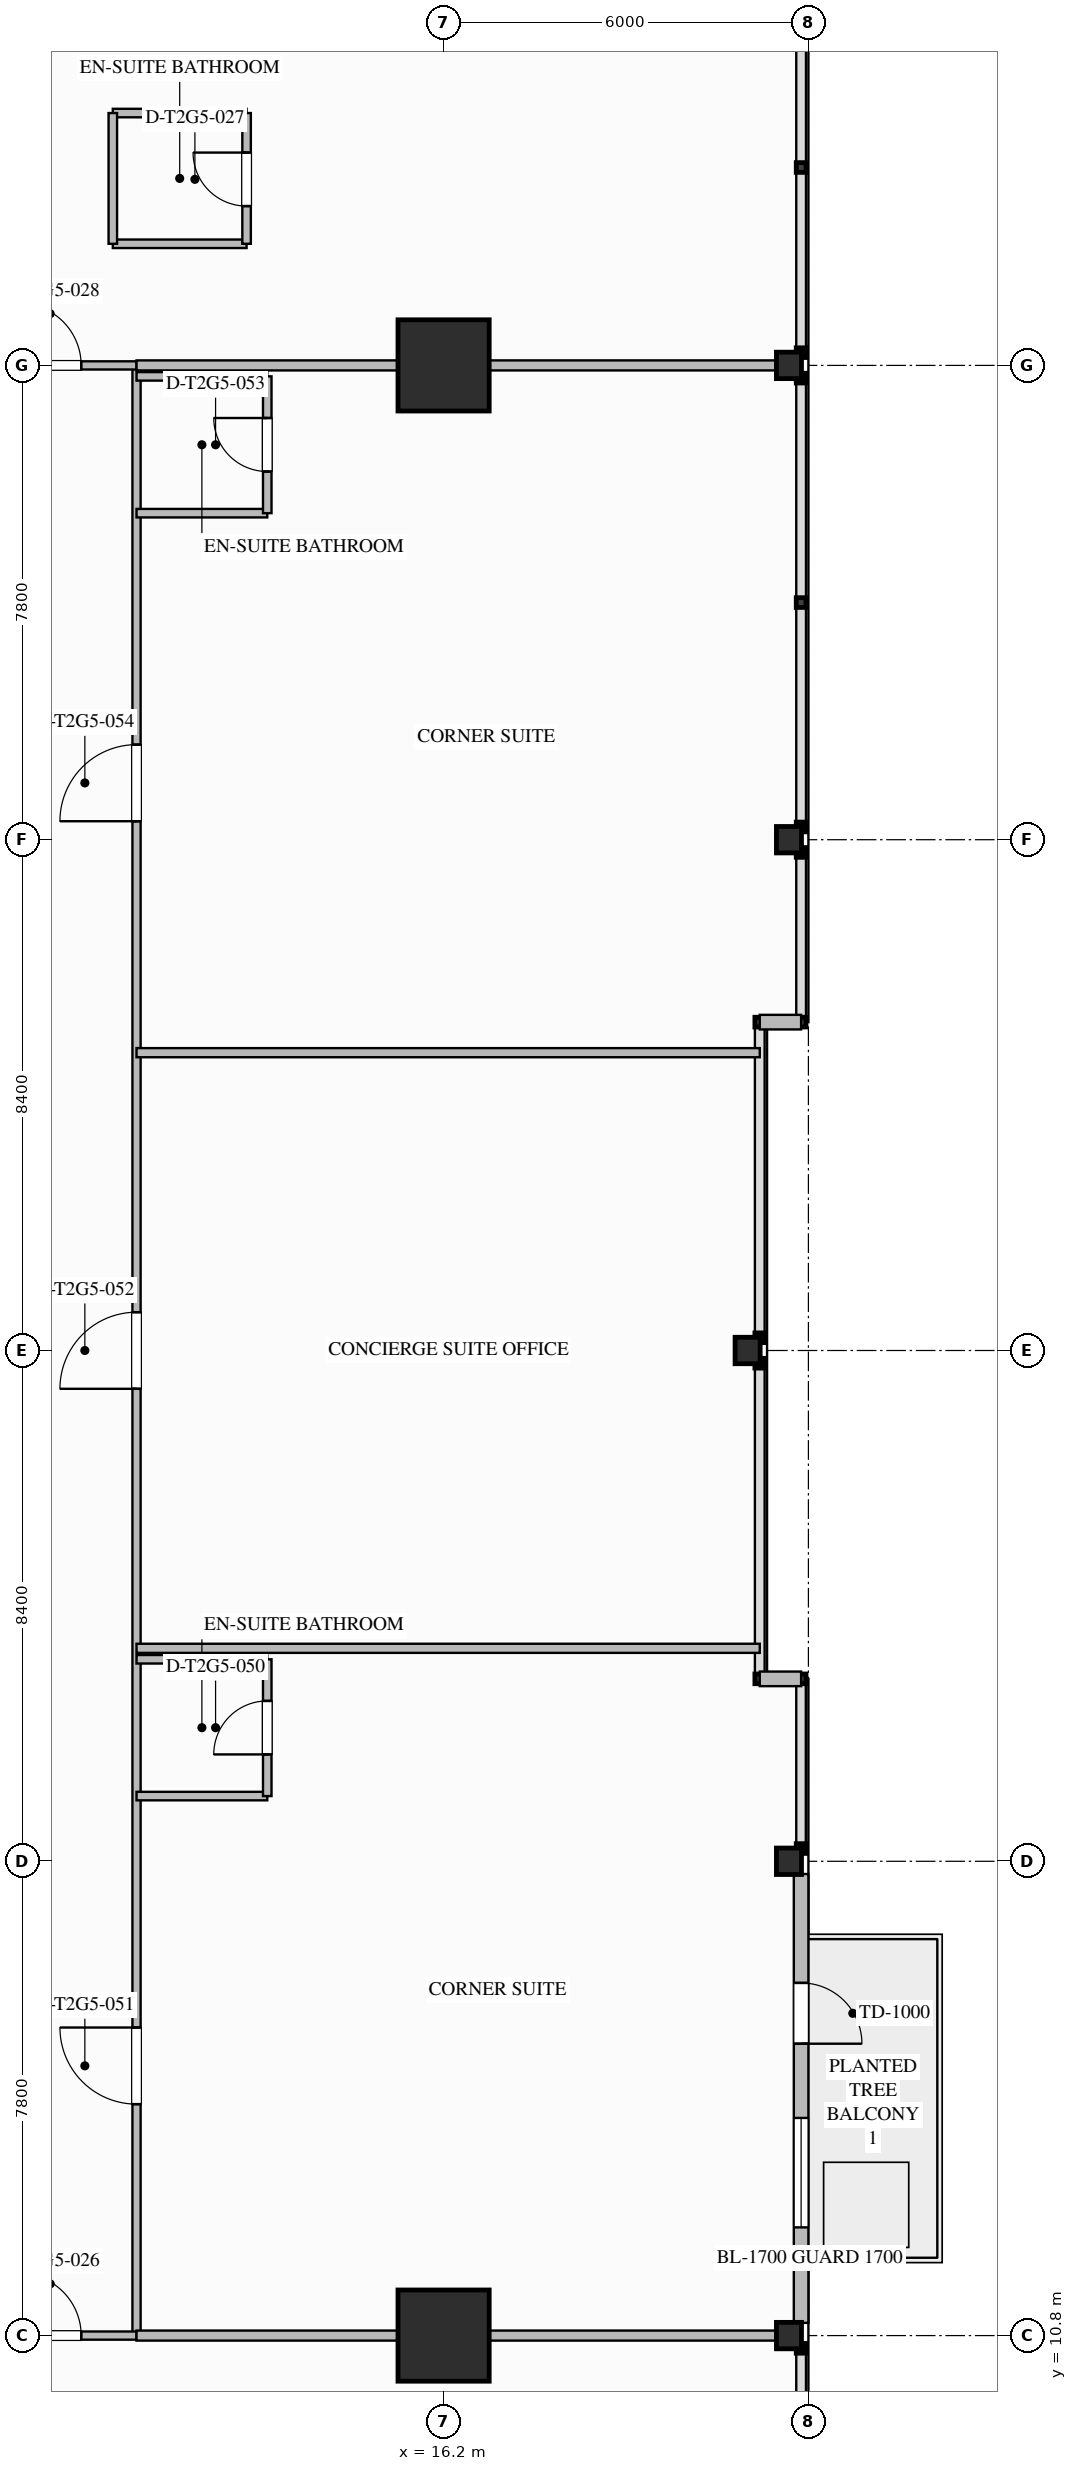
"""IFC4 building model, lengths in metres.
Left out: names, types, materials, properties, quantities, classifications, styles, units other than length and angle.
Written with IfcOpenShell. Run it as: python <this file> out.ifc"""

import sys

from ifc_helpers import new_model, si_unit, direction, frame, frame_2d, origin, origin_2d, place, context, subcontext, project, spatial, rectangle, i_section, extrude, element, fill, save


model = new_model("IFC4")
c1 = context("Model", 3, precision=1e-05, world=origin(), true_north=direction((0.0, 1.0)))
c2 = subcontext(c1, "Body", "Model", "MODEL_VIEW")
j1 = project(units=[si_unit("LENGTHUNIT", "METRE"), si_unit("PLANEANGLEUNIT", "RADIAN")], contexts=[c1])
p1 = place(None, origin())
s1 = spatial("IfcSite", under=j1, at=p1, CompositionType="ELEMENT")
p2 = place(p1, origin())
s2 = spatial("IfcBuilding", under=s1, at=p2, CompositionType="ELEMENT")
p3 = place(p2, frame((0.0, 0.0, 133.8)))
s3 = spatial("IfcBuildingStorey", under=s2, at=p3, CompositionType="ELEMENT", Elevation=133.8)
for number, where, z_axis, x_axis in (
    (1, (16.2, 10.8, 0.0), (0.0, 0.0, 1.0), (1.0, 0.0, 0.0)),
    (2, (16.2, 43.2, 0.0), (0.0, 0.0, 1.0), (1.0, 0.0, 0.0)),
):
    element("IfcColumn", number, at=place(p3, frame(where, z_axis=z_axis, x_axis=x_axis)), inside=s3, PredefinedType="COLUMN", context=c2, shape_type="SweptSolid", body=[
        extrude(rectangle(XDim=1.5, YDim=1.5, at=origin_2d()), origin(), (0.0, 0.0, 1.0), 3.5),
    ])
for number, where, z_axis, x_axis in (
    (3, (21.88, 10.8, 0.0), (0.0, 0.0, 1.0), (1.0, 0.0, 0.0)),
    (4, (21.88, 18.6, 0.0), (0.0, 0.0, 1.0), (1.0, 0.0, 0.0)),
    (5, (21.2, 27.0, 0.0), (0.0, 0.0, 1.0), (1.0, 0.0, 0.0)),
    (6, (21.88, 35.4, 0.0), (0.0, 0.0, 1.0), (1.0, 0.0, 0.0)),
    (7, (21.88, 43.2, 0.0), (0.0, 0.0, 1.0), (1.0, 0.0, 0.0)),
):
    element("IfcColumn", number, at=place(p3, frame(where, z_axis=z_axis, x_axis=x_axis)), inside=s3, PredefinedType="COLUMN", context=c2, shape_type="SweptSolid", body=[
        extrude(i_section(OverallWidth=0.412, OverallDepth=0.435, WebThickness=0.036, FlangeThickness=0.057, FilletRadius=0.028, at=origin_2d()), origin(), (0.0, 0.0, 1.0), 3.497),
    ])
p4 = place(p3, frame((22.08, 18.391, 0.0), z_axis=(0.0, 0.0, 1.0), x_axis=(0.0, -1.0, 0.0)))
e8 = element("IfcWall", 8, at=p4, inside=s3, PredefinedType="STANDARD", context=c2, shape_type="SweptSolid", body=[
    extrude(rectangle(XDim=7.381, YDim=0.24, at=frame_2d((3.69, 0.0))), origin(), (0.0, 0.0, 1.0), 2.629),
])
p5 = place(p4, frame((1.791, 0.0, 0.0)))
e9 = element("IfcOpeningElement", 9, at=p5, cuts=e8, PredefinedType="OPENING", context=c2, shape_type="SweptSolid", body=[
    extrude(rectangle(XDim=1.0, YDim=2.2, at=frame_2d((0.5, 1.1))), frame((0.0, 0.13, 0.0), z_axis=(0.0, -1.0, 0.0), x_axis=(1.0, 0.0, 0.0)), (0.0, 0.0, 1.0), 0.26),
])
p6 = place(p4, frame((4.011, 0.0, 0.75)))
e10 = element("IfcOpeningElement", 10, at=p6, cuts=e8, PredefinedType="OPENING", context=c2, shape_type="SweptSolid", body=[
    extrude(rectangle(XDim=1.8, YDim=1.779, at=frame_2d((0.9, 0.889))), frame((0.0, 0.13, 0.0), z_axis=(0.0, -1.0, 0.0), x_axis=(1.0, 0.0, 0.0)), (0.0, 0.0, 1.0), 0.26),
])
for number, where, z_axis, x_axis in (
    (11, (22.08, 32.4, 0.0), (0.0, 0.0, 1.0), (-1.0, 0.0, 0.0)),
    (12, (21.4, 21.6, 0.0), (0.0, 0.0, 1.0), (1.0, 0.0, 0.0)),
):
    element("IfcWall", number, at=place(p3, frame(where, z_axis=z_axis, x_axis=x_axis)), inside=s3, PredefinedType="STANDARD", context=c2, shape_type="SweptSolid", body=[
        extrude(rectangle(XDim=0.68, YDim=0.24, at=frame_2d((0.34, 0.0))), origin(), (0.0, 0.0, 1.0), 3.24),
    ])
p7 = place(p3, frame((11.15, 10.8, 0.0), z_axis=(0.0, 0.0, 1.0), x_axis=(0.0, 1.0, 0.0)))
e13 = element("IfcWall", 13, at=p7, inside=s3, PredefinedType="PARTITIONING", context=c2, shape_type="SweptSolid", body=[
    extrude(rectangle(XDim=32.4, YDim=0.135, at=frame_2d((16.2, 0.0))), origin(), (0.0, 0.0, 1.0), 3.24),
])
p8 = place(p7, frame((3.806, 0.0, 0.0)))
e14 = element("IfcOpeningElement", 14, at=p8, cuts=e13, PredefinedType="OPENING", context=c2, shape_type="SweptSolid", body=[
    extrude(rectangle(XDim=1.26, YDim=2.2, at=frame_2d((0.63, 1.1))), frame((0.0, 0.077, 0.0), z_axis=(0.0, -1.0, 0.0), x_axis=(1.0, 0.0, 0.0)), (0.0, 0.0, 1.0), 0.155),
])
p9 = place(p7, frame((15.57, 0.0, 0.0)))
e15 = element("IfcOpeningElement", 15, at=p9, cuts=e13, PredefinedType="OPENING", context=c2, shape_type="SweptSolid", body=[
    extrude(rectangle(XDim=1.26, YDim=2.2, at=frame_2d((0.63, 1.1))), frame((0.0, 0.077, 0.0), z_axis=(0.0, -1.0, 0.0), x_axis=(1.0, 0.0, 0.0)), (0.0, 0.0, 1.0), 0.155),
])
p10 = place(p7, frame((24.904, 0.0, 0.0)))
e16 = element("IfcOpeningElement", 16, at=p10, cuts=e13, PredefinedType="OPENING", context=c2, shape_type="SweptSolid", body=[
    extrude(rectangle(XDim=1.26, YDim=2.2, at=frame_2d((0.63, 1.1))), frame((0.0, 0.077, 0.0), z_axis=(0.0, -1.0, 0.0), x_axis=(1.0, 0.0, 0.0)), (0.0, 0.0, 1.0), 0.155),
])
p11 = place(p3, frame((8.7, 10.8, 0.0), z_axis=(0.0, 0.0, 1.0), x_axis=(1.0, 0.0, 0.0)))
e17 = element("IfcWall", 17, at=p11, inside=s3, PredefinedType="PARTITIONING", context=c2, shape_type="SweptSolid", body=[
    extrude(rectangle(XDim=2.45, YDim=0.135, at=frame_2d((1.225, 0.0))), origin(), (0.0, 0.0, 1.0), 2.53),
])
p12 = place(p11, frame((0.52, 0.0, 0.0)))
e18 = element("IfcOpeningElement", 18, at=p12, cuts=e17, PredefinedType="OPENING", context=c2, shape_type="SweptSolid", body=[
    extrude(rectangle(XDim=1.02, YDim=2.15, at=frame_2d((0.51, 1.075))), frame((0.0, 0.077, 0.0), z_axis=(0.0, -1.0, 0.0), x_axis=(1.0, 0.0, 0.0)), (0.0, 0.0, 1.0), 0.155),
])
p13 = place(p3, frame((8.7, 43.2, 0.0), z_axis=(0.0, 0.0, 1.0), x_axis=(1.0, 0.0, 0.0)))
e19 = element("IfcWall", 19, at=p13, inside=s3, PredefinedType="PARTITIONING", context=c2, shape_type="SweptSolid", body=[
    extrude(rectangle(XDim=2.45, YDim=0.135, at=frame_2d((1.225, 0.0))), origin(), (0.0, 0.0, 1.0), 2.53),
])
p14 = place(p13, frame((0.52, 0.0, 0.0)))
e20 = element("IfcOpeningElement", 20, at=p14, cuts=e19, PredefinedType="OPENING", context=c2, shape_type="SweptSolid", body=[
    extrude(rectangle(XDim=1.02, YDim=2.15, at=frame_2d((0.51, 1.075))), frame((0.0, 0.077, 0.0), z_axis=(0.0, -1.0, 0.0), x_axis=(1.0, 0.0, 0.0)), (0.0, 0.0, 1.0), 0.155),
])
for number, where, z_axis, x_axis in (
    (21, (11.15, 10.8, 0.0), (0.0, 0.0, 1.0), (1.0, 0.0, 0.0)),
    (22, (11.15, 43.2, 0.0), (0.0, 0.0, 1.0), (1.0, 0.0, 0.0)),
):
    element("IfcWall", number, at=place(p3, frame(where, z_axis=z_axis, x_axis=x_axis)), inside=s3, PredefinedType="PARTITIONING", context=c2, shape_type="SweptSolid", body=[
        extrude(rectangle(XDim=10.93, YDim=0.165, at=frame_2d((5.465, 0.0))), origin(), (0.0, 0.0, 1.0), 2.53),
    ])
for number, where, z_axis, x_axis in (
    (23, (10.76, 45.2, 0.0), (0.0, 0.0, 1.0), (1.0, 0.0, 0.0)),
    (24, (10.76, 47.35, 0.0), (0.0, 0.0, 1.0), (1.0, 0.0, 0.0)),
):
    element("IfcWall", number, at=place(p3, frame(where, z_axis=z_axis, x_axis=x_axis)), inside=s3, PredefinedType="PLUMBINGWALL", context=c2, shape_type="SweptSolid", body=[
        extrude(rectangle(XDim=2.2, YDim=0.14, at=frame_2d((1.1, 0.0))), origin(), (0.0, 0.0, 1.0), 3.24),
    ])
p15 = place(p3, frame((10.76, 45.2, 0.0), z_axis=(0.0, 0.0, 1.0), x_axis=(0.0, 1.0, 0.0)))
e25 = element("IfcWall", 25, at=p15, inside=s3, PredefinedType="PLUMBINGWALL", context=c2, shape_type="SweptSolid", body=[
    extrude(rectangle(XDim=2.15, YDim=0.14, at=frame_2d((1.075, 0.0))), origin(), (0.0, 0.0, 1.0), 3.24),
])
p16 = place(p3, frame((12.96, 45.2, 0.0), z_axis=(0.0, 0.0, 1.0), x_axis=(0.0, 1.0, 0.0)))
e26 = element("IfcWall", 26, at=p16, inside=s3, PredefinedType="PLUMBINGWALL", context=c2, shape_type="SweptSolid", body=[
    extrude(rectangle(XDim=2.15, YDim=0.14, at=frame_2d((1.075, 0.0))), origin(), (0.0, 0.0, 1.0), 3.24),
])
p17 = place(p16, frame((0.62, 0.0, 0.0)))
e27 = element("IfcOpeningElement", 27, at=p17, cuts=e26, PredefinedType="OPENING", context=c2, shape_type="SweptSolid", body=[
    extrude(rectangle(XDim=0.88, YDim=2.1, at=frame_2d((0.44, 1.05))), frame((0.0, 0.08, 0.0), z_axis=(0.0, -1.0, 0.0), x_axis=(1.0, 0.0, 0.0)), (0.0, 0.0, 1.0), 0.16),
])
for number, where, z_axis, x_axis in (
    (28, (11.15, 19.672, 0.0), (0.0, 0.0, 1.0), (1.0, 0.0, 0.0)),
    (29, (11.15, 21.922, 0.0), (0.0, 0.0, 1.0), (1.0, 0.0, 0.0)),
):
    element("IfcWall", number, at=place(p3, frame(where, z_axis=z_axis, x_axis=x_axis)), inside=s3, PredefinedType="PLUMBINGWALL", context=c2, shape_type="SweptSolid", body=[
        extrude(rectangle(XDim=2.15, YDim=0.14, at=frame_2d((1.075, 0.0))), origin(), (0.0, 0.0, 1.0), 3.24),
    ])
p18 = place(p3, frame((13.3, 19.672, 0.0), z_axis=(0.0, 0.0, 1.0), x_axis=(0.0, 1.0, 0.0)))
e30 = element("IfcWall", 30, at=p18, inside=s3, PredefinedType="PLUMBINGWALL", context=c2, shape_type="SweptSolid", body=[
    extrude(rectangle(XDim=2.25, YDim=0.14, at=frame_2d((1.125, 0.0))), origin(), (0.0, 0.0, 1.0), 3.24),
])
p19 = place(p18, frame((0.685, 0.0, 0.0)))
e31 = element("IfcOpeningElement", 31, at=p19, cuts=e30, PredefinedType="OPENING", context=c2, shape_type="SweptSolid", body=[
    extrude(rectangle(XDim=0.88, YDim=2.1, at=frame_2d((0.44, 1.05))), frame((0.0, 0.08, 0.0), z_axis=(0.0, -1.0, 0.0), x_axis=(1.0, 0.0, 0.0)), (0.0, 0.0, 1.0), 0.16),
])
for number, where, z_axis, x_axis in (
    (32, (11.15, 22.102, 0.0), (0.0, 0.0, 1.0), (1.0, 0.0, 0.0)),
    (33, (11.15, 31.898, 0.0), (0.0, 0.0, 1.0), (1.0, 0.0, 0.0)),
):
    element("IfcWall", number, at=place(p3, frame(where, z_axis=z_axis, x_axis=x_axis)), inside=s3, PredefinedType="PARTITIONING", context=c2, shape_type="SweptSolid", body=[
        extrude(rectangle(XDim=10.25, YDim=0.15, at=frame_2d((5.125, 0.0))), origin(), (0.0, 0.0, 1.0), 3.24),
    ])
p20 = place(p3, frame((11.15, 40.77, 0.0), z_axis=(0.0, 0.0, 1.0), x_axis=(1.0, 0.0, 0.0)))
e34 = element("IfcWall", 34, at=p20, inside=s3, PredefinedType="PLUMBINGWALL", context=c2, shape_type="SweptSolid", body=[
    extrude(rectangle(XDim=2.15, YDim=0.14, at=frame_2d((1.075, 0.0))), origin(), (0.0, 0.0, 1.0), 3.24),
])
p21 = place(p3, frame((11.15, 43.02, 0.0), z_axis=(0.0, 0.0, 1.0), x_axis=(1.0, 0.0, 0.0)))
e35 = element("IfcWall", 35, at=p21, inside=s3, PredefinedType="PLUMBINGWALL", context=c2, shape_type="SweptSolid", body=[
    extrude(rectangle(XDim=2.15, YDim=0.14, at=frame_2d((1.075, 0.0))), origin(), (0.0, 0.0, 1.0), 2.53),
])
p22 = place(p3, frame((13.3, 40.77, 0.0), z_axis=(0.0, 0.0, 1.0), x_axis=(0.0, 1.0, 0.0)))
e36 = element("IfcWall", 36, at=p22, inside=s3, PredefinedType="PLUMBINGWALL", context=c2, shape_type="SweptSolid", body=[
    extrude(rectangle(XDim=2.25, YDim=0.14, at=frame_2d((1.125, 0.0))), origin(), (0.0, 0.0, 1.0), 3.24),
])
p23 = place(p22, frame((0.685, 0.0, 0.0)))
e37 = element("IfcOpeningElement", 37, at=p23, cuts=e36, PredefinedType="OPENING", context=c2, shape_type="SweptSolid", body=[
    extrude(rectangle(XDim=0.88, YDim=2.1, at=frame_2d((0.44, 1.05))), frame((0.0, 0.08, 0.0), z_axis=(0.0, -1.0, 0.0), x_axis=(1.0, 0.0, 0.0)), (0.0, 0.0, 1.0), 0.16),
])
p24 = place(p5, origin())
e38 = element("IfcDoor", 38, at=p24, inside=s3, OperationType="SINGLE_SWING_RIGHT", PredefinedType="DOOR", context=c2, shape_type="SweptSolid", body=[
    extrude(rectangle(XDim=1.0, YDim=2.2, at=frame_2d((0.5, 1.1))), frame((0.0, 0.025, 0.0), z_axis=(0.0, -1.0, 0.0), x_axis=(1.0, 0.0, 0.0)), (0.0, 0.0, 1.0), 0.05),
])
fill(e9, e38)
p25 = place(p6, origin())
e39 = element("IfcWindow", 39, at=p25, inside=s3, PartitioningType="SINGLE_PANEL", PredefinedType="WINDOW", context=c2, shape_type="SweptSolid", body=[
    extrude(rectangle(XDim=1.8, YDim=1.779, at=frame_2d((0.9, 0.889))), frame((0.0, 0.03, 0.0), z_axis=(0.0, -1.0, 0.0), x_axis=(1.0, 0.0, 0.0)), (0.0, 0.0, 1.0), 0.06),
])
fill(e10, e39)
p26 = place(p12, origin())
e40 = element("IfcDoor", 40, at=p26, inside=s3, OperationType="SINGLE_SWING_LEFT", PredefinedType="DOOR", context=c2, shape_type="SweptSolid", body=[
    extrude(rectangle(XDim=1.02, YDim=2.15, at=frame_2d((0.51, 1.075))), frame((0.0, 0.025, 0.0), z_axis=(0.0, -1.0, 0.0), x_axis=(1.0, 0.0, 0.0)), (0.0, 0.0, 1.0), 0.05),
])
fill(e18, e40)
p27 = place(p17, origin())
e41 = element("IfcDoor", 41, at=p27, inside=s3, OperationType="SINGLE_SWING_RIGHT", PredefinedType="DOOR", context=c2, shape_type="SweptSolid", body=[
    extrude(rectangle(XDim=0.88, YDim=2.1, at=frame_2d((0.44, 1.05))), frame((0.0, 0.025, 0.0), z_axis=(0.0, -1.0, 0.0), x_axis=(1.0, 0.0, 0.0)), (0.0, 0.0, 1.0), 0.05),
])
fill(e27, e41)
p28 = place(p14, origin())
e42 = element("IfcDoor", 42, at=p28, inside=s3, OperationType="SINGLE_SWING_LEFT", PredefinedType="DOOR", context=c2, shape_type="SweptSolid", body=[
    extrude(rectangle(XDim=1.02, YDim=2.15, at=frame_2d((0.51, 1.075))), frame((0.0, 0.025, 0.0), z_axis=(0.0, -1.0, 0.0), x_axis=(1.0, 0.0, 0.0)), (0.0, 0.0, 1.0), 0.05),
])
fill(e20, e42)
p29 = place(p19, origin())
e43 = element("IfcDoor", 43, at=p29, inside=s3, OperationType="SINGLE_SWING_LEFT", PredefinedType="DOOR", context=c2, shape_type="SweptSolid", body=[
    extrude(rectangle(XDim=0.88, YDim=2.1, at=frame_2d((0.44, 1.05))), frame((0.0, 0.025, 0.0), z_axis=(0.0, -1.0, 0.0), x_axis=(1.0, 0.0, 0.0)), (0.0, 0.0, 1.0), 0.05),
])
fill(e31, e43)
p30 = place(p8, origin())
e44 = element("IfcDoor", 44, at=p30, inside=s3, OperationType="SINGLE_SWING_RIGHT", PredefinedType="DOOR", context=c2, shape_type="SweptSolid", body=[
    extrude(rectangle(XDim=1.26, YDim=2.2, at=frame_2d((0.63, 1.1))), frame((0.0, 0.025, 0.0), z_axis=(0.0, -1.0, 0.0), x_axis=(1.0, 0.0, 0.0)), (0.0, 0.0, 1.0), 0.05),
])
fill(e14, e44)
p31 = place(p9, origin())
e45 = element("IfcDoor", 45, at=p31, inside=s3, OperationType="SINGLE_SWING_LEFT", PredefinedType="DOOR", context=c2, shape_type="SweptSolid", body=[
    extrude(rectangle(XDim=1.26, YDim=2.2, at=frame_2d((0.63, 1.1))), frame((0.0, 0.025, 0.0), z_axis=(0.0, -1.0, 0.0), x_axis=(1.0, 0.0, 0.0)), (0.0, 0.0, 1.0), 0.05),
])
fill(e15, e45)
p32 = place(p23, origin())
e46 = element("IfcDoor", 46, at=p32, inside=s3, OperationType="SINGLE_SWING_RIGHT", PredefinedType="DOOR", context=c2, shape_type="SweptSolid", body=[
    extrude(rectangle(XDim=0.88, YDim=2.1, at=frame_2d((0.44, 1.05))), frame((0.0, 0.025, 0.0), z_axis=(0.0, -1.0, 0.0), x_axis=(1.0, 0.0, 0.0)), (0.0, 0.0, 1.0), 0.05),
])
fill(e37, e46)
p33 = place(p10, origin())
e47 = element("IfcDoor", 47, at=p33, inside=s3, OperationType="SINGLE_SWING_LEFT", PredefinedType="DOOR", context=c2, shape_type="SweptSolid", body=[
    extrude(rectangle(XDim=1.26, YDim=2.2, at=frame_2d((0.63, 1.1))), frame((0.0, 0.025, 0.0), z_axis=(0.0, -1.0, 0.0), x_axis=(1.0, 0.0, 0.0)), (0.0, 0.0, 1.0), 0.05),
])
fill(e16, e47)
save(model, sys.argv[1])
